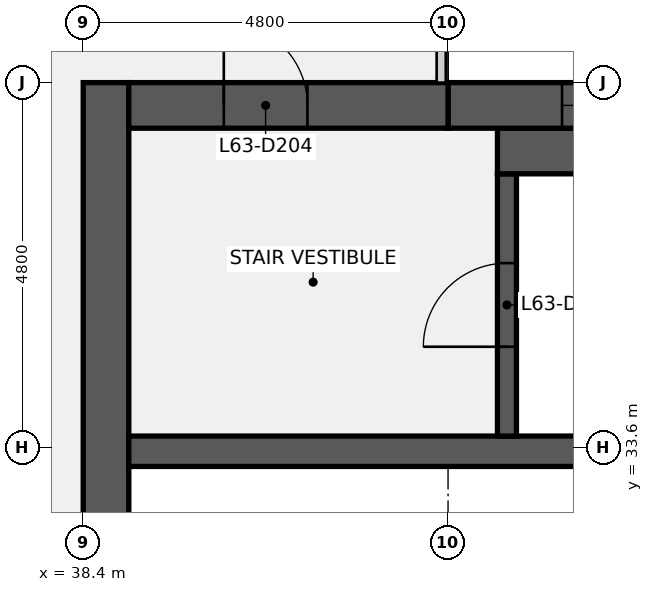
"""IFC4 building model, lengths in metres.
Left out: names, types, materials, properties, quantities, classifications, styles, units other than length and angle.
Written with IfcOpenShell. Run it as: python <this file> out.ifc"""

import sys

from ifc_helpers import new_model, si_unit, direction, frame, frame_2d, origin, place, context, subcontext, project, spatial, rectangle, extrude, element, fill, save


model = new_model("IFC4")
c1 = context("Model", 3, precision=1e-05, world=origin(), true_north=direction((0.0, 1.0)))
c2 = subcontext(c1, "Body", "Model", "MODEL_VIEW")
j1 = project(units=[si_unit("LENGTHUNIT", "METRE"), si_unit("PLANEANGLEUNIT", "RADIAN")], contexts=[c1])
p1 = place(None, origin())
s1 = spatial("IfcSite", under=j1, at=p1, CompositionType="ELEMENT")
p2 = place(p1, origin())
s2 = spatial("IfcBuilding", under=s1, at=p2, CompositionType="ELEMENT")
p3 = place(p2, frame((0.0, 0.0, 290.3)))
s3 = spatial("IfcBuildingStorey", under=s2, at=p3, CompositionType="ELEMENT", Elevation=290.3)
p4 = place(p3, frame((38.7, 9.6, 0.0), z_axis=(0.0, 0.0, 1.0), x_axis=(0.0, 1.0, 0.0)))
e1 = element("IfcWall", 1, at=p4, inside=s3, PredefinedType="SHEAR", context=c2, shape_type="SweptSolid", body=[
    extrude(rectangle(XDim=28.8, YDim=0.6, at=frame_2d((14.4, 0.0))), origin(), (0.0, 0.0, 1.0), 3.84),
])
p5 = place(p4, frame((8.7, 0.0, 0.0)))
e2 = element("IfcOpeningElement", 2, at=p5, cuts=e1, PredefinedType="OPENING", context=c2, shape_type="SweptSolid", body=[
    extrude(rectangle(XDim=1.8, YDim=2.1, at=frame_2d((0.9, 1.05))), frame((0.0, 0.31, 0.0), z_axis=(0.0, -1.0, 0.0), x_axis=(1.0, 0.0, 0.0)), (0.0, 0.0, 1.0), 0.62),
])
p6 = place(p4, frame((18.3, 0.0, 0.0)))
e3 = element("IfcOpeningElement", 3, at=p6, cuts=e1, PredefinedType="OPENING", context=c2, shape_type="SweptSolid", body=[
    extrude(rectangle(XDim=1.8, YDim=2.1, at=frame_2d((0.9, 1.05))), frame((0.0, 0.31, 0.0), z_axis=(0.0, -1.0, 0.0), x_axis=(1.0, 0.0, 0.0)), (0.0, 0.0, 1.0), 0.62),
])
p7 = place(p3, frame((39.0, 33.55, 0.0), z_axis=(0.0, 0.0, 1.0), x_axis=(1.0, 0.0, 0.0)))
e4 = element("IfcWall", 4, at=p7, inside=s3, PredefinedType="SHEAR", context=c2, shape_type="SweptSolid", body=[
    extrude(rectangle(XDim=18.0, YDim=0.4, at=frame_2d((9.0, 0.0))), origin(), (0.0, 0.0, 1.0), 3.84),
])
p8 = place(p3, frame((43.975, 33.75, 0.0), z_axis=(0.0, 0.0, 1.0), x_axis=(0.0, 1.0, 0.0)))
e5 = element("IfcWall", 5, at=p8, inside=s3, PredefinedType="SHEAR", context=c2, shape_type="SweptSolid", body=[
    extrude(rectangle(XDim=3.45, YDim=0.25, at=frame_2d((1.725, 0.0))), origin(), (0.0, 0.0, 1.0), 3.84),
])
p9 = place(p8, frame((1.175, 0.0, 0.0)))
e6 = element("IfcOpeningElement", 6, at=p9, cuts=e5, PredefinedType="OPENING", context=c2, shape_type="SweptSolid", body=[
    extrude(rectangle(XDim=1.1, YDim=2.1, at=frame_2d((0.55, 1.05))), frame((0.0, 0.135, 0.0), z_axis=(0.0, -1.0, 0.0), x_axis=(1.0, 0.0, 0.0)), (0.0, 0.0, 1.0), 0.27),
])
p10 = place(p3, frame((43.85, 37.5, 0.0), z_axis=(0.0, 0.0, 1.0), x_axis=(1.0, 0.0, 0.0)))
e7 = element("IfcWall", 7, at=p10, inside=s3, PredefinedType="SHEAR", context=c2, shape_type="SweptSolid", body=[
    extrude(rectangle(XDim=7.5, YDim=0.6, at=frame_2d((3.75, 0.0))), origin(), (0.0, 0.0, 1.0), 3.84),
])
p11 = place(p3, frame((43.2, 38.1, 0.0), z_axis=(0.0, 0.0, 1.0), x_axis=(1.0, 0.0, 0.0)))
e8 = element("IfcWall", 8, at=p11, inside=s3, PredefinedType="SHEAR", context=c2, shape_type="SweptSolid", body=[
    extrude(rectangle(XDim=13.8, YDim=0.6, at=frame_2d((6.9, 0.0))), origin(), (0.0, 0.0, 1.0), 3.84),
])
p12 = place(p11, frame((6.3, 0.0, 0.9)))
e9 = element("IfcOpeningElement", 9, at=p12, cuts=e8, PredefinedType="OPENING", context=c2, shape_type="SweptSolid", body=[
    extrude(rectangle(XDim=1.8, YDim=1.5, at=frame_2d((0.9, 0.75))), frame((0.0, 0.31, 0.0), z_axis=(0.0, -1.0, 0.0), x_axis=(1.0, 0.0, 0.0)), (0.0, 0.0, 1.0), 0.62),
])
p13 = place(p11, frame((1.5, 0.0, 0.9)))
e10 = element("IfcOpeningElement", 10, at=p13, cuts=e8, PredefinedType="OPENING", context=c2, shape_type="SweptSolid", body=[
    extrude(rectangle(XDim=1.8, YDim=1.5, at=frame_2d((0.9, 0.75))), frame((0.0, 0.31, 0.0), z_axis=(0.0, -1.0, 0.0), x_axis=(1.0, 0.0, 0.0)), (0.0, 0.0, 1.0), 0.62),
])
p14 = place(p3, frame((39.0, 38.1, 0.0), z_axis=(0.0, 0.0, 1.0), x_axis=(1.0, 0.0, 0.0)))
e11 = element("IfcWall", 11, at=p14, inside=s3, PredefinedType="SHEAR", context=c2, shape_type="SweptSolid", body=[
    extrude(rectangle(XDim=4.2, YDim=0.6, at=frame_2d((2.1, 0.0))), origin(), (0.0, 0.0, 1.0), 3.84),
])
p15 = place(p14, frame((1.25, 0.0, 0.0)))
e12 = element("IfcOpeningElement", 12, at=p15, cuts=e11, PredefinedType="OPENING", context=c2, shape_type="SweptSolid", body=[
    extrude(rectangle(XDim=1.1, YDim=2.1, at=frame_2d((0.55, 1.05))), frame((0.0, 0.31, 0.0), z_axis=(0.0, -1.0, 0.0), x_axis=(1.0, 0.0, 0.0)), (0.0, 0.0, 1.0), 0.62),
])
p16 = place(p9, origin())
e13 = element("IfcDoor", 13, at=p16, inside=s3, OperationType="SINGLE_SWING_LEFT", PredefinedType="DOOR", context=c2, shape_type="SweptSolid", body=[
    extrude(rectangle(XDim=1.1, YDim=2.1, at=frame_2d((0.55, 1.05))), frame((0.0, 0.025, 0.0), z_axis=(0.0, -1.0, 0.0), x_axis=(1.0, 0.0, 0.0)), (0.0, 0.0, 1.0), 0.05),
])
fill(e6, e13)
p17 = place(p15, origin())
e14 = element("IfcDoor", 14, at=p17, inside=s3, OperationType="SINGLE_SWING_LEFT", PredefinedType="DOOR", context=c2, shape_type="SweptSolid", body=[
    extrude(rectangle(XDim=1.1, YDim=2.1, at=frame_2d((0.55, 1.05))), frame((0.0, 0.025, 0.0), z_axis=(0.0, -1.0, 0.0), x_axis=(1.0, 0.0, 0.0)), (0.0, 0.0, 1.0), 0.05),
])
fill(e12, e14)
p18 = place(p13, origin())
e15 = element("IfcWindow", 15, at=p18, inside=s3, PartitioningType="SINGLE_PANEL", PredefinedType="WINDOW", context=c2, shape_type="SweptSolid", body=[
    extrude(rectangle(XDim=1.8, YDim=1.5, at=frame_2d((0.9, 0.75))), frame((0.0, 0.03, 0.0), z_axis=(0.0, -1.0, 0.0), x_axis=(1.0, 0.0, 0.0)), (0.0, 0.0, 1.0), 0.06),
])
fill(e10, e15)
save(model, sys.argv[1])
